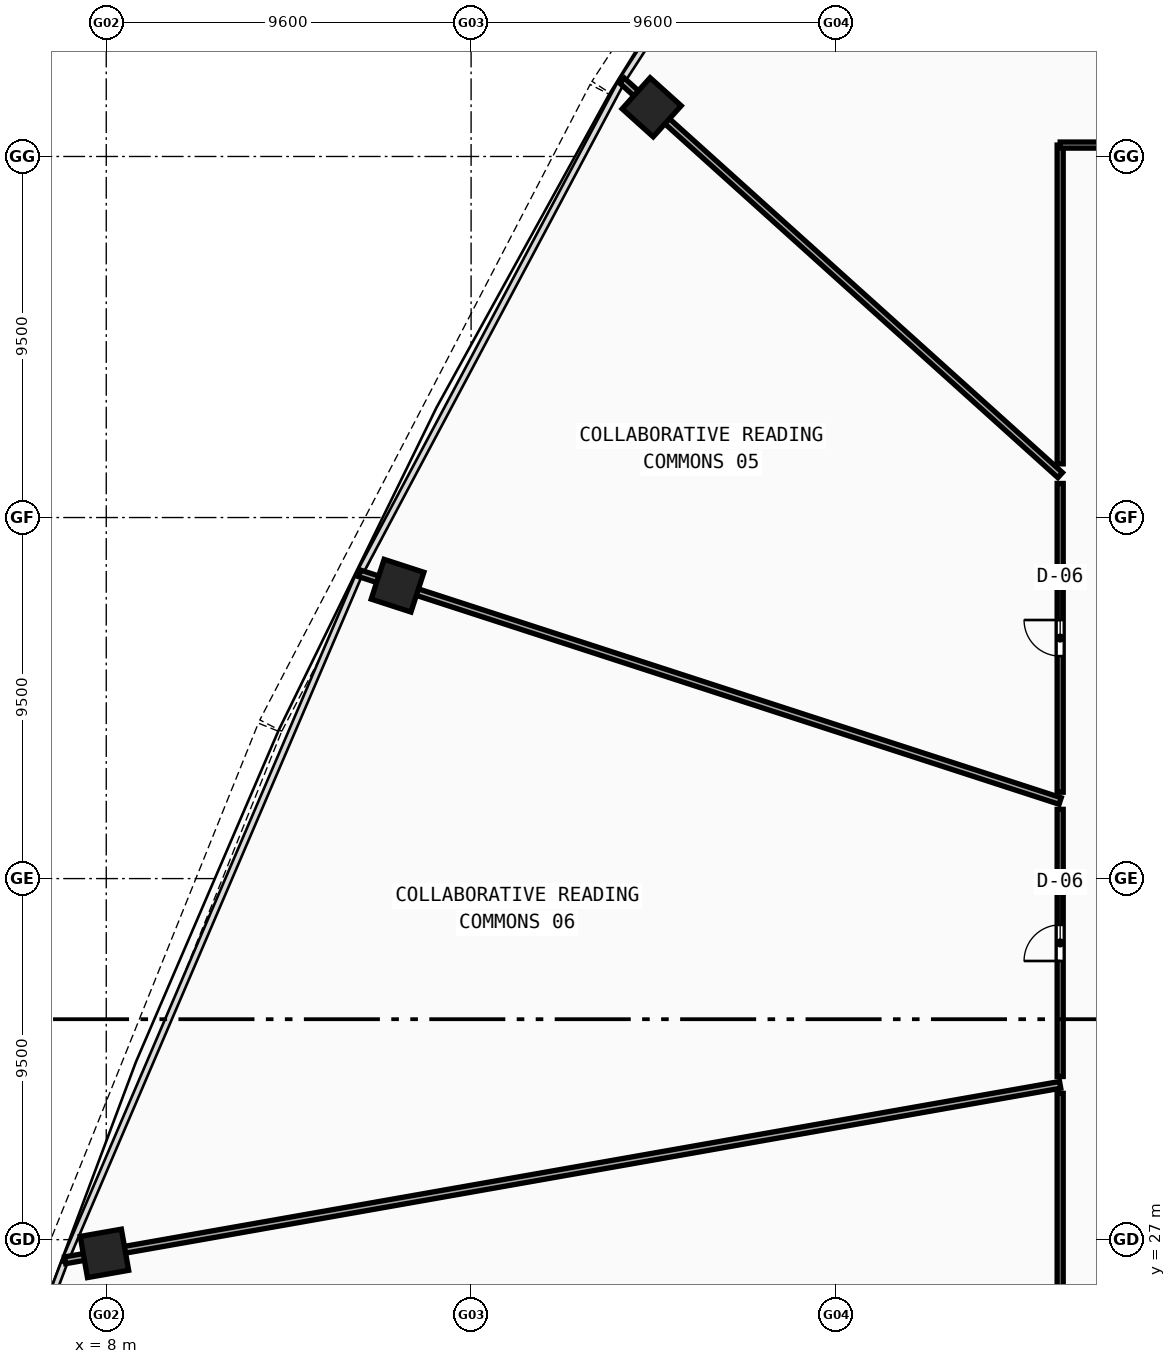
"""IFC4 building model, lengths in metres.
Left out: names, types, materials, properties, quantities, classifications, styles, units other than length and angle.
Written with IfcOpenShell. Run it as: python <this file> out.ifc"""

import sys

from ifc_helpers import new_model, si_unit, direction, frame, frame_2d, origin, origin_with_axes, origin_2d, place, context, subcontext, project, spatial, rectangle, hollow_rectangle, extrude, source, transform, mapped, element, fill, save


model = new_model("IFC4")
c1 = context("Model", 3, precision=1e-05, world=origin(), true_north=direction((0.0, 1.0)))
c2 = subcontext(c1, "Body", "Model", "MODEL_VIEW")
j1 = project(units=[si_unit("LENGTHUNIT", "METRE"), si_unit("PLANEANGLEUNIT", "RADIAN")], contexts=[c1])
p1 = place(None, origin())
s1 = spatial("IfcSite", under=j1, at=p1, CompositionType="ELEMENT")
p2 = place(p1, origin())
s2 = spatial("IfcBuilding", under=s1, at=p2, CompositionType="ELEMENT")
p3 = place(p2, frame((0.0, 0.0, 66.7)))
s3 = spatial("IfcBuildingStorey", under=s2, at=p3, CompositionType="ELEMENT", Elevation=66.7)
m1 = source(origin(), c2, "Body", "SweptSolid", [
    extrude(hollow_rectangle(XDim=1.1, YDim=1.1, WallThickness=0.045, at=origin_2d()), origin(), (0.0, 0.0, 1.0), 3.63),
])
for number, where, z_axis, x_axis in (
    (1, (22.351, 56.794, -0.26), (0.0, 0.0, 1.0), (-0.669, -0.743, 0.0)),
    (2, (15.665, 44.206, -0.26), (0.0, 0.0, 1.0), (-0.309, -0.951, 0.0)),
    (3, (7.952, 26.638, -0.26), (0.0, 0.0, 1.0), (0.174, -0.985, 0.0)),
):
    element("IfcColumn", number, at=place(p3, frame(where, z_axis=z_axis, x_axis=x_axis)), inside=s3, PredefinedType="COLUMN", context=c2, shape_type="MappedRepresentation", body=[
        mapped(m1, transform((0.0, 0.0, 0.0), scale=1.0)),
    ])
p4 = place(p3, frame((33.1, 47.116, 0.0), z_axis=(0.0, 0.0, 1.0), x_axis=(-0.743143105339, 0.669132516761, 0.0)))
e4 = element("IfcWall", 4, at=p4, inside=s3, PredefinedType="PARTITIONING", context=c2, shape_type="SweptSolid", body=[
    extrude(rectangle(XDim=15.514, YDim=0.18, at=frame_2d((7.757, 0.0))), origin(), (0.0, 0.0, 1.0), 2.67),
])
p5 = place(p3, frame((33.1, 38.541, 0.0), z_axis=(0.0, 0.0, 1.0), x_axis=(-0.951054245528, 0.309023982992, 0.0)))
e5 = element("IfcWall", 5, at=p5, inside=s3, PredefinedType="PARTITIONING", context=c2, shape_type="SweptSolid", body=[
    extrude(rectangle(XDim=19.383, YDim=0.18, at=frame_2d((9.691, 0.0))), origin(), (0.0, 0.0, 1.0), 2.67),
])
p6 = place(p3, frame((33.1, 31.073, 0.0), z_axis=(0.0, 0.0, 1.0), x_axis=(-0.984808509529, -0.173643887195, 0.0)))
e6 = element("IfcWall", 6, at=p6, inside=s3, PredefinedType="PARTITIONING", context=c2, shape_type="SweptSolid", body=[
    extrude(rectangle(XDim=26.586, YDim=0.18, at=frame_2d((13.293, 0.0))), origin(), (0.0, 0.0, 1.0), 2.67),
])
p7 = place(p3, frame((33.1, 24.8, 0.0), z_axis=(0.0, 0.0, 1.0), x_axis=(0.0, 1.0, 0.0)))
e7 = element("IfcWall", 7, at=p7, inside=s3, PredefinedType="PARTITIONING", context=c2, shape_type="SweptSolid", body=[
    extrude(rectangle(XDim=6.049, YDim=0.16, at=frame_2d((3.025, 0.0))), origin(), (0.0, 0.0, 1.0), 2.97),
])
p8 = place(p3, frame((33.1, 31.292, 0.0), z_axis=(0.0, 0.0, 1.0), x_axis=(0.0, 1.0, 0.0)))
e8 = element("IfcWall", 8, at=p8, inside=s3, PredefinedType="PARTITIONING", context=c2, shape_type="SweptSolid", body=[
    extrude(rectangle(XDim=7.029, YDim=0.16, at=frame_2d((3.515, 0.0))), origin(), (0.0, 0.0, 1.0), 3.37),
])
p9 = place(p8, frame((3.04, 0.0, 0.0)))
e9 = element("IfcOpeningElement", 9, at=p9, cuts=e8, PredefinedType="OPENING", context=c2, shape_type="SweptSolid", body=[
    extrude(rectangle(XDim=0.95, YDim=2.1, at=frame_2d((0.475, 1.05))), frame((0.0, 0.09, 0.0), z_axis=(0.0, -1.0, 0.0), x_axis=(1.0, 0.0, 0.0)), (0.0, 0.0, 1.0), 0.18),
])
p10 = place(p3, frame((33.1, 38.773, 0.0), z_axis=(0.0, 0.0, 1.0), x_axis=(0.0, 1.0, 0.0)))
e10 = element("IfcWall", 10, at=p10, inside=s3, PredefinedType="PARTITIONING", context=c2, shape_type="SweptSolid", body=[
    extrude(rectangle(XDim=8.124, YDim=0.16, at=frame_2d((4.062, 0.0))), origin(), (0.0, 0.0, 1.0), 2.67),
])
p11 = place(p10, frame((3.581, 0.0, 0.0)))
e11 = element("IfcOpeningElement", 11, at=p11, cuts=e10, PredefinedType="OPENING", context=c2, shape_type="SweptSolid", body=[
    extrude(rectangle(XDim=0.95, YDim=2.1, at=frame_2d((0.475, 1.05))), frame((0.0, 0.09, 0.0), z_axis=(0.0, -1.0, 0.0), x_axis=(1.0, 0.0, 0.0)), (0.0, 0.0, 1.0), 0.18),
])
p12 = place(p3, frame((33.1, 47.412, 0.0), z_axis=(0.0, 0.0, 1.0), x_axis=(0.0, 1.0, 0.0)))
e12 = element("IfcWall", 12, at=p12, inside=s3, PredefinedType="PARTITIONING", context=c2, shape_type="SweptSolid", body=[
    extrude(rectangle(XDim=8.388, YDim=0.16, at=frame_2d((4.194, 0.0))), origin(), (0.0, 0.0, 1.0), 3.37),
])
p13 = place(p3, frame((33.1, 55.8, 0.0), z_axis=(0.0, 0.0, 1.0), x_axis=(1.0, 0.0, 0.0)))
e13 = element("IfcWall", 13, at=p13, inside=s3, PredefinedType="PARTITIONING", context=c2, shape_type="SweptSolid", body=[
    extrude(rectangle(XDim=10.609, YDim=0.16, at=frame_2d((5.304, 0.0))), origin(), (0.0, 0.0, 1.0), 2.67),
])
p14 = place(p13, frame((4.635, 0.0, 0.0)))
e14 = element("IfcOpeningElement", 14, at=p14, cuts=e13, PredefinedType="OPENING", context=c2, shape_type="SweptSolid", body=[
    extrude(rectangle(XDim=0.95, YDim=2.1, at=frame_2d((0.475, 1.05))), frame((0.0, 0.09, 0.0), z_axis=(0.0, -1.0, 0.0), x_axis=(1.0, 0.0, 0.0)), (0.0, 0.0, 1.0), 0.18),
])
m2 = source(origin(), c2, "Body", "SweptSolid", [
    extrude(rectangle(XDim=0.95, YDim=2.1, at=frame_2d((0.475, 1.05))), frame((0.0, 0.025, 0.0), z_axis=(0.0, -1.0, 0.0), x_axis=(1.0, 0.0, 0.0)), (0.0, 0.0, 1.0), 0.05),
])
p15 = place(p11, origin_with_axes())
e15 = element("IfcDoor", 15, at=p15, inside=s3, OperationType="SINGLE_SWING_RIGHT", PredefinedType="DOOR", context=c2, shape_type="MappedRepresentation", body=[
    mapped(m2, transform((0.0, 0.0, 0.0), scale=1.0)),
])
fill(e11, e15)
p16 = place(p9, origin_with_axes())
e16 = element("IfcDoor", 16, at=p16, inside=s3, OperationType="SINGLE_SWING_LEFT", PredefinedType="DOOR", context=c2, shape_type="MappedRepresentation", body=[
    mapped(m2, transform((0.0, 0.0, 0.0), scale=1.0)),
])
fill(e9, e16)
save(model, sys.argv[1])
